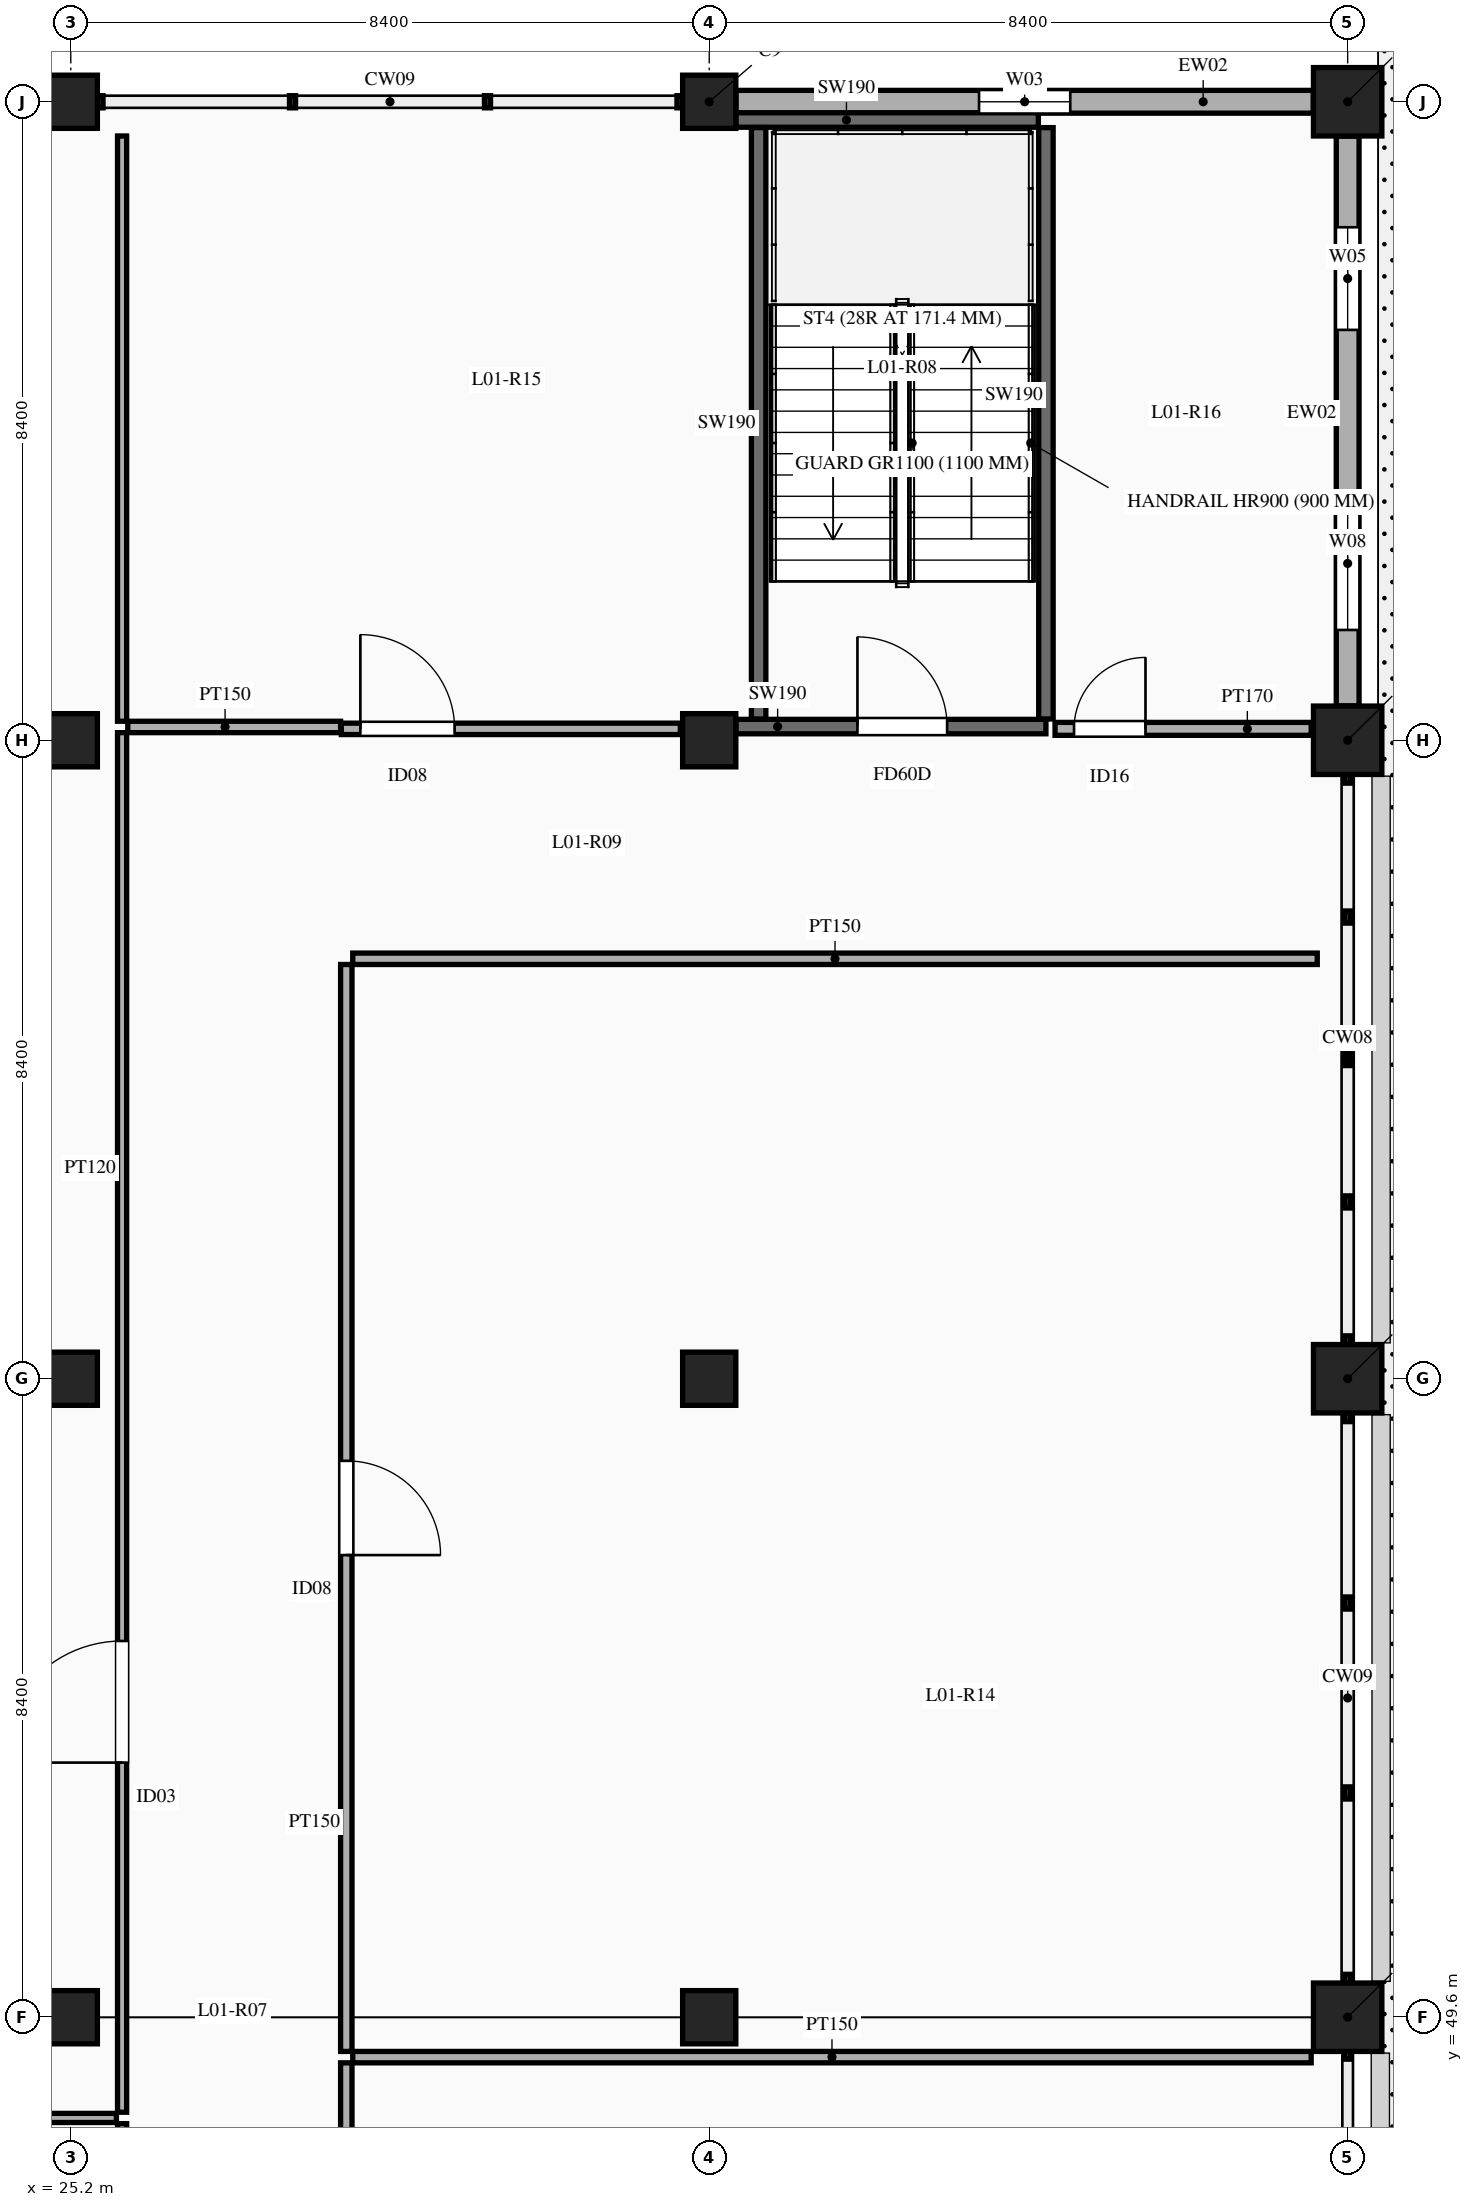
"""IFC4 building model, lengths in metres.
Left out: names, types, materials, properties, quantities, classifications, styles, units other than length and angle.
Written with IfcOpenShell. Run it as: python <this file> out.ifc"""

import sys

from ifc_helpers import new_model, si_unit, direction, frame, frame_2d, origin, origin_2d, place, context, subcontext, project, spatial, rectangle, circle, extrude, element, fill, save


model = new_model("IFC4")
c1 = context("Model", 3, precision=1e-05, world=origin(), true_north=direction((0.0, 1.0)))
c2 = subcontext(c1, "Body", "Model", "MODEL_VIEW")
j1 = project(units=[si_unit("LENGTHUNIT", "METRE"), si_unit("PLANEANGLEUNIT", "RADIAN")], contexts=[c1])
p1 = place(None, origin())
s1 = spatial("IfcSite", under=j1, at=p1, CompositionType="ELEMENT")
p2 = place(p1, origin())
s2 = spatial("IfcBuilding", under=s1, at=p2, CompositionType="ELEMENT")
p3 = place(p2, frame((0.0, 0.0, 5.4)))
s3 = spatial("IfcBuildingStorey", under=s2, at=p3, CompositionType="ELEMENT", Elevation=5.4)
for number, where, z_axis, x_axis in (
    (1, (25.2, 49.6, 0.0), (0.0, 0.0, 1.0), (1.0, 0.0, 0.0)),
    (2, (25.2, 58.0, 0.0), (0.0, 0.0, 1.0), (1.0, 0.0, 0.0)),
    (3, (25.2, 66.4, 0.0), (0.0, 0.0, 1.0), (1.0, 0.0, 0.0)),
    (4, (25.2, 74.8, 0.0), (0.0, 0.0, 1.0), (1.0, 0.0, 0.0)),
    (5, (33.6, 49.6, 0.0), (0.0, 0.0, 1.0), (1.0, 0.0, 0.0)),
    (6, (33.6, 58.0, 0.0), (0.0, 0.0, 1.0), (1.0, 0.0, 0.0)),
    (7, (33.6, 66.4, 0.0), (0.0, 0.0, 1.0), (1.0, 0.0, 0.0)),
    (8, (33.6, 74.8, 0.0), (0.0, 0.0, 1.0), (1.0, 0.0, 0.0)),
):
    element("IfcColumn", number, at=place(p3, frame(where, z_axis=z_axis, x_axis=x_axis)), inside=s3, PredefinedType="COLUMN", context=c2, shape_type="SweptSolid", body=[
        extrude(rectangle(XDim=0.7, YDim=0.7, at=origin_2d()), origin(), (0.0, 0.0, 1.0), 4.8),
    ])
for number, where, z_axis, x_axis in (
    (9, (42.0, 49.6, 0.0), (0.0, 0.0, 1.0), (1.0, 0.0, 0.0)),
    (10, (42.0, 58.0, 0.0), (0.0, 0.0, 1.0), (1.0, 0.0, 0.0)),
    (11, (42.0, 66.4, 0.0), (0.0, 0.0, 1.0), (1.0, 0.0, 0.0)),
    (12, (42.0, 74.8, 0.0), (0.0, 0.0, 1.0), (1.0, 0.0, 0.0)),
):
    element("IfcColumn", number, at=place(p3, frame(where, z_axis=z_axis, x_axis=x_axis)), inside=s3, PredefinedType="COLUMN", context=c2, shape_type="SweptSolid", body=[
        extrude(circle(Radius=0.45, at=origin_2d()), origin(), (0.0, 0.0, 1.0), 4.8),
    ])
p4 = place(p3, frame((33.952, 74.8, 0.0), z_axis=(0.0, 0.0, 1.0), x_axis=(1.0, 0.0, 0.0)))
e13 = element("IfcWall", 13, at=p4, inside=s3, PredefinedType="SOLIDWALL", context=c2, shape_type="SweptSolid", body=[
    extrude(rectangle(XDim=7.596, YDim=0.3, at=frame_2d((3.798, 0.0))), origin(), (0.0, 0.0, 1.0), 3.85),
])
p5 = place(p4, frame((3.198, 0.0, 1.1)))
e14 = element("IfcOpeningElement", 14, at=p5, cuts=e13, PredefinedType="OPENING", context=c2, shape_type="SweptSolid", body=[
    extrude(rectangle(XDim=1.2, YDim=1.2, at=frame_2d((0.6, 0.6))), frame((0.0, 0.16, 0.0), z_axis=(0.0, -1.0, 0.0), x_axis=(1.0, 0.0, 0.0)), (0.0, 0.0, 1.0), 0.32),
])
p6 = place(p3, frame((42.0, 66.852, 0.0), z_axis=(0.0, 0.0, 1.0), x_axis=(0.0, 1.0, 0.0)))
e15 = element("IfcWall", 15, at=p6, inside=s3, PredefinedType="SOLIDWALL", context=c2, shape_type="SweptSolid", body=[
    extrude(rectangle(XDim=7.496, YDim=0.3, at=frame_2d((3.748, 0.0))), origin(), (0.0, 0.0, 1.0), 3.85),
])
p7 = place(p6, frame((0.999, 0.0, 0.9)))
e16 = element("IfcOpeningElement", 16, at=p7, cuts=e15, PredefinedType="OPENING", context=c2, shape_type="SweptSolid", body=[
    extrude(rectangle(XDim=1.75, YDim=2.2, at=frame_2d((0.875, 1.1))), frame((0.0, 0.16, 0.0), z_axis=(0.0, -1.0, 0.0), x_axis=(1.0, 0.0, 0.0)), (0.0, 0.0, 1.0), 0.32),
])
p8 = place(p6, frame((4.947, 0.0, 0.9)))
e17 = element("IfcOpeningElement", 17, at=p8, cuts=e15, PredefinedType="OPENING", context=c2, shape_type="SweptSolid", body=[
    extrude(rectangle(XDim=1.35, YDim=1.85, at=frame_2d((0.675, 0.925))), frame((0.0, 0.16, 0.0), z_axis=(0.0, -1.0, 0.0), x_axis=(1.0, 0.0, 0.0)), (0.0, 0.0, 1.0), 0.32),
])
p9 = place(p3, frame((33.95, 66.58, 0.0), z_axis=(0.0, 0.0, 1.0), x_axis=(1.0, 0.0, 0.0)))
e18 = element("IfcWall", 18, at=p9, inside=s3, PredefinedType="SOLIDWALL", context=c2, shape_type="SweptSolid", body=[
    extrude(rectangle(XDim=4.08, YDim=0.19, at=frame_2d((2.04, 0.0))), origin(), (0.0, 0.0, 1.0), 4.58),
])
p10 = place(p9, frame((1.6, 0.0, 0.0)))
e19 = element("IfcOpeningElement", 19, at=p10, cuts=e18, PredefinedType="OPENING", context=c2, shape_type="SweptSolid", body=[
    extrude(rectangle(XDim=1.18, YDim=2.15, at=frame_2d((0.59, 1.075))), frame((0.0, 0.105, 0.0), z_axis=(0.0, -1.0, 0.0), x_axis=(1.0, 0.0, 0.0)), (0.0, 0.0, 1.0), 0.21),
])
p11 = place(p3, frame((33.95, 74.56, 0.0), z_axis=(0.0, 0.0, 1.0), x_axis=(1.0, 0.0, 0.0)))
e20 = element("IfcWall", 20, at=p11, inside=s3, PredefinedType="SOLIDWALL", context=c2, shape_type="SweptSolid", body=[
    extrude(rectangle(XDim=3.98, YDim=0.19, at=frame_2d((1.99, 0.0))), origin(), (0.0, 0.0, 1.0), 4.58),
])
for number, where, z_axis, x_axis in (
    (21, (34.25, 66.68, 0.0), (0.0, 0.0, 1.0), (0.0, 1.0, 0.0)),
    (22, (38.03, 66.68, 0.0), (0.0, 0.0, 1.0), (0.0, 1.0, 0.0)),
):
    element("IfcWall", number, at=place(p3, frame(where, z_axis=z_axis, x_axis=x_axis)), inside=s3, PredefinedType="SOLIDWALL", context=c2, shape_type="SweptSolid", body=[
        extrude(rectangle(XDim=7.78, YDim=0.19, at=frame_2d((3.89, 0.0))), origin(), (0.0, 0.0, 1.0), 4.58),
    ])
p12 = place(p3, frame((25.875, 23.2, 0.0), z_axis=(0.0, 0.0, 1.0), x_axis=(0.0, 1.0, 0.0)))
e23 = element("IfcWall", 23, at=p12, inside=s3, PredefinedType="PARTITIONING", context=c2, shape_type="SweptSolid", body=[
    extrude(rectangle(XDim=25.0, YDim=0.12, at=frame_2d((12.5, 0.0))), origin(), (0.0, 0.0, 1.0), 2.95),
])
p13 = place(p12, frame((14.619, 0.0, 0.0)))
e24 = element("IfcOpeningElement", 24, at=p13, cuts=e23, PredefinedType="OPENING", context=c2, shape_type="SweptSolid", body=[
    extrude(rectangle(XDim=1.6, YDim=2.35, at=frame_2d((0.8, 1.175))), frame((0.0, 0.07, 0.0), z_axis=(0.0, -1.0, 0.0), x_axis=(1.0, 0.0, 0.0)), (0.0, 0.0, 1.0), 0.14),
])
p14 = place(p3, frame((25.875, 48.35, 0.0), z_axis=(0.0, 0.0, 1.0), x_axis=(0.0, 1.0, 0.0)))
e25 = element("IfcWall", 25, at=p14, inside=s3, PredefinedType="PARTITIONING", context=c2, shape_type="SweptSolid", body=[
    extrude(rectangle(XDim=18.15, YDim=0.12, at=frame_2d((9.075, 0.0))), origin(), (0.0, 0.0, 1.0), 2.95),
])
p15 = place(p14, frame((4.6, 0.0, 0.0)))
e26 = element("IfcOpeningElement", 26, at=p15, cuts=e25, PredefinedType="OPENING", context=c2, shape_type="SweptSolid", body=[
    extrude(rectangle(XDim=1.6, YDim=2.35, at=frame_2d((0.8, 1.175))), frame((0.0, 0.07, 0.0), z_axis=(0.0, -1.0, 0.0), x_axis=(1.0, 0.0, 0.0)), (0.0, 0.0, 1.0), 0.14),
])
p16 = place(p3, frame((28.825, 34.302, 0.0), z_axis=(0.0, 0.0, 1.0), x_axis=(0.0, 1.0, 0.0)))
e27 = element("IfcWall", 27, at=p16, inside=s3, PredefinedType="PARTITIONING", context=c2, shape_type="SweptSolid", body=[
    extrude(rectangle(XDim=14.698, YDim=0.15, at=frame_2d((7.349, 0.0))), origin(), (0.0, 0.0, 1.0), 2.95),
])
p17 = place(p16, frame((6.729, 0.0, 0.0)))
e28 = element("IfcOpeningElement", 28, at=p17, cuts=e27, PredefinedType="OPENING", context=c2, shape_type="SweptSolid", body=[
    extrude(rectangle(XDim=1.24, YDim=2.2, at=frame_2d((0.62, 1.1))), frame((0.0, 0.085, 0.0), z_axis=(0.0, -1.0, 0.0), x_axis=(1.0, 0.0, 0.0)), (0.0, 0.0, 1.0), 0.17),
])
p18 = place(p3, frame((28.825, 49.15, 0.0), z_axis=(0.0, 0.0, 1.0), x_axis=(0.0, 1.0, 0.0)))
e29 = element("IfcWall", 29, at=p18, inside=s3, PredefinedType="PARTITIONING", context=c2, shape_type="SweptSolid", body=[
    extrude(rectangle(XDim=14.3, YDim=0.15, at=frame_2d((7.15, 0.0))), origin(), (0.0, 0.0, 1.0), 2.95),
])
p19 = place(p18, frame((6.53, 0.0, 0.0)))
e30 = element("IfcOpeningElement", 30, at=p19, cuts=e29, PredefinedType="OPENING", context=c2, shape_type="SweptSolid", body=[
    extrude(rectangle(XDim=1.24, YDim=2.2, at=frame_2d((0.62, 1.1))), frame((0.0, 0.085, 0.0), z_axis=(0.0, -1.0, 0.0), x_axis=(1.0, 0.0, 0.0)), (0.0, 0.0, 1.0), 0.17),
])
p20 = place(p3, frame((25.95, 66.575, 0.0), z_axis=(0.0, 0.0, 1.0), x_axis=(1.0, 0.0, 0.0)))
e31 = element("IfcWall", 31, at=p20, inside=s3, PredefinedType="PARTITIONING", context=c2, shape_type="SweptSolid", body=[
    extrude(rectangle(XDim=2.8, YDim=0.15, at=frame_2d((1.4, 0.0))), origin(), (0.0, 0.0, 1.0), 2.95),
])
p21 = place(p3, frame((28.91, 63.525, 0.0), z_axis=(0.0, 0.0, 1.0), x_axis=(1.0, 0.0, 0.0)))
e32 = element("IfcWall", 32, at=p21, inside=s3, PredefinedType="PARTITIONING", context=c2, shape_type="SweptSolid", body=[
    extrude(rectangle(XDim=12.69, YDim=0.15, at=frame_2d((6.345, 0.0))), origin(), (0.0, 0.0, 1.0), 2.95),
])
p22 = place(p3, frame((28.76, 66.55, 0.0), z_axis=(0.0, 0.0, 1.0), x_axis=(1.0, 0.0, 0.0)))
e33 = element("IfcWall", 33, at=p22, inside=s3, PredefinedType="PARTITIONING", context=c2, shape_type="SweptSolid", body=[
    extrude(rectangle(XDim=4.46, YDim=0.15, at=frame_2d((2.23, 0.0))), origin(), (0.0, 0.0, 1.0), 2.95),
])
p23 = place(p22, frame((0.25, 0.0, 0.0)))
e34 = element("IfcOpeningElement", 34, at=p23, cuts=e33, PredefinedType="OPENING", context=c2, shape_type="SweptSolid", body=[
    extrude(rectangle(XDim=1.24, YDim=2.2, at=frame_2d((0.62, 1.1))), frame((0.0, 0.085, 0.0), z_axis=(0.0, -1.0, 0.0), x_axis=(1.0, 0.0, 0.0)), (0.0, 0.0, 1.0), 0.17),
])
p24 = place(p3, frame((38.15, 66.55, 0.0), z_axis=(0.0, 0.0, 1.0), x_axis=(1.0, 0.0, 0.0)))
e35 = element("IfcWall", 35, at=p24, inside=s3, PredefinedType="PARTITIONING", context=c2, shape_type="SweptSolid", body=[
    extrude(rectangle(XDim=3.37, YDim=0.17, at=frame_2d((1.685, 0.0))), origin(), (0.0, 0.0, 1.0), 2.95),
])
p25 = place(p24, frame((0.25, 0.0, 0.0)))
e36 = element("IfcOpeningElement", 36, at=p25, cuts=e35, PredefinedType="OPENING", context=c2, shape_type="SweptSolid", body=[
    extrude(rectangle(XDim=0.94, YDim=2.1, at=frame_2d((0.47, 1.05))), frame((0.0, 0.095, 0.0), z_axis=(0.0, -1.0, 0.0), x_axis=(1.0, 0.0, 0.0)), (0.0, 0.0, 1.0), 0.19),
])
p26 = place(p3, frame((8.85, 48.275, 0.0), z_axis=(0.0, 0.0, 1.0), x_axis=(1.0, 0.0, 0.0)))
e37 = element("IfcWall", 37, at=p26, inside=s3, PredefinedType="PARTITIONING", context=c2, shape_type="SweptSolid", body=[
    extrude(rectangle(XDim=16.95, YDim=0.12, at=frame_2d((8.475, 0.0))), origin(), (0.0, 0.0, 1.0), 2.95),
])
p27 = place(p3, frame((25.875, 66.65, 0.0), z_axis=(0.0, 0.0, 1.0), x_axis=(0.0, 1.0, 0.0)))
e38 = element("IfcWall", 38, at=p27, inside=s3, PredefinedType="PARTITIONING", context=c2, shape_type="SweptSolid", body=[
    extrude(rectangle(XDim=7.7, YDim=0.12, at=frame_2d((3.85, 0.0))), origin(), (0.0, 0.0, 1.0), 2.95),
])
p28 = place(p3, frame((28.91, 49.075, 0.0), z_axis=(0.0, 0.0, 1.0), x_axis=(1.0, 0.0, 0.0)))
e39 = element("IfcWall", 39, at=p28, inside=s3, PredefinedType="PARTITIONING", context=c2, shape_type="SweptSolid", body=[
    extrude(rectangle(XDim=12.61, YDim=0.15, at=frame_2d((6.305, 0.0))), origin(), (0.0, 0.0, 1.0), 2.95),
])
p29 = place(p5, origin())
e40 = element("IfcWindow", 40, at=p29, inside=s3, PartitioningType="SINGLE_PANEL", PredefinedType="WINDOW", context=c2, shape_type="SweptSolid", body=[
    extrude(rectangle(XDim=1.2, YDim=1.2, at=frame_2d((0.6, 0.6))), frame((0.0, 0.03, 0.0), z_axis=(0.0, -1.0, 0.0), x_axis=(1.0, 0.0, 0.0)), (0.0, 0.0, 1.0), 0.06),
])
fill(e14, e40)
p30 = place(p7, origin())
e41 = element("IfcWindow", 41, at=p30, inside=s3, PartitioningType="DOUBLE_PANEL_VERTICAL", PredefinedType="WINDOW", context=c2, shape_type="SweptSolid", body=[
    extrude(rectangle(XDim=1.75, YDim=2.2, at=frame_2d((0.875, 1.1))), frame((0.0, 0.03, 0.0), z_axis=(0.0, -1.0, 0.0), x_axis=(1.0, 0.0, 0.0)), (0.0, 0.0, 1.0), 0.06),
])
fill(e16, e41)
p31 = place(p8, origin())
e42 = element("IfcWindow", 42, at=p31, inside=s3, PartitioningType="DOUBLE_PANEL_VERTICAL", PredefinedType="WINDOW", context=c2, shape_type="SweptSolid", body=[
    extrude(rectangle(XDim=1.35, YDim=1.85, at=frame_2d((0.675, 0.925))), frame((0.0, 0.03, 0.0), z_axis=(0.0, -1.0, 0.0), x_axis=(1.0, 0.0, 0.0)), (0.0, 0.0, 1.0), 0.06),
])
fill(e17, e42)
p32 = place(p10, origin())
e43 = element("IfcDoor", 43, at=p32, inside=s3, OperationType="SINGLE_SWING_LEFT", PredefinedType="DOOR", context=c2, shape_type="SweptSolid", body=[
    extrude(rectangle(XDim=1.18, YDim=2.15, at=frame_2d((0.59, 1.075))), frame((0.0, 0.025, 0.0), z_axis=(0.0, -1.0, 0.0), x_axis=(1.0, 0.0, 0.0)), (0.0, 0.0, 1.0), 0.05),
])
fill(e19, e43)
p33 = place(p15, origin())
e44 = element("IfcDoor", 44, at=p33, inside=s3, OperationType="SINGLE_SWING_LEFT", PredefinedType="DOOR", context=c2, shape_type="SweptSolid", body=[
    extrude(rectangle(XDim=1.6, YDim=2.35, at=frame_2d((0.8, 1.175))), frame((0.0, 0.025, 0.0), z_axis=(0.0, -1.0, 0.0), x_axis=(1.0, 0.0, 0.0)), (0.0, 0.0, 1.0), 0.05),
])
fill(e26, e44)
p34 = place(p19, frame((1.24, 0.0, 0.0), z_axis=(0.0, 0.0, 1.0), x_axis=(-1.0, 0.0, 0.0)))
e45 = element("IfcDoor", 45, at=p34, inside=s3, OperationType="SINGLE_SWING_RIGHT", PredefinedType="DOOR", context=c2, shape_type="SweptSolid", body=[
    extrude(rectangle(XDim=1.24, YDim=2.2, at=frame_2d((0.62, 1.1))), frame((0.0, 0.025, 0.0), z_axis=(0.0, -1.0, 0.0), x_axis=(1.0, 0.0, 0.0)), (0.0, 0.0, 1.0), 0.05),
])
fill(e30, e45)
p35 = place(p23, origin())
e46 = element("IfcDoor", 46, at=p35, inside=s3, OperationType="SINGLE_SWING_LEFT", PredefinedType="DOOR", context=c2, shape_type="SweptSolid", body=[
    extrude(rectangle(XDim=1.24, YDim=2.2, at=frame_2d((0.62, 1.1))), frame((0.0, 0.025, 0.0), z_axis=(0.0, -1.0, 0.0), x_axis=(1.0, 0.0, 0.0)), (0.0, 0.0, 1.0), 0.05),
])
fill(e34, e46)
p36 = place(p25, origin())
e47 = element("IfcDoor", 47, at=p36, inside=s3, OperationType="SINGLE_SWING_RIGHT", PredefinedType="DOOR", context=c2, shape_type="SweptSolid", body=[
    extrude(rectangle(XDim=0.94, YDim=2.1, at=frame_2d((0.47, 1.05))), frame((0.0, 0.025, 0.0), z_axis=(0.0, -1.0, 0.0), x_axis=(1.0, 0.0, 0.0)), (0.0, 0.0, 1.0), 0.05),
])
fill(e36, e47)
save(model, sys.argv[1])
